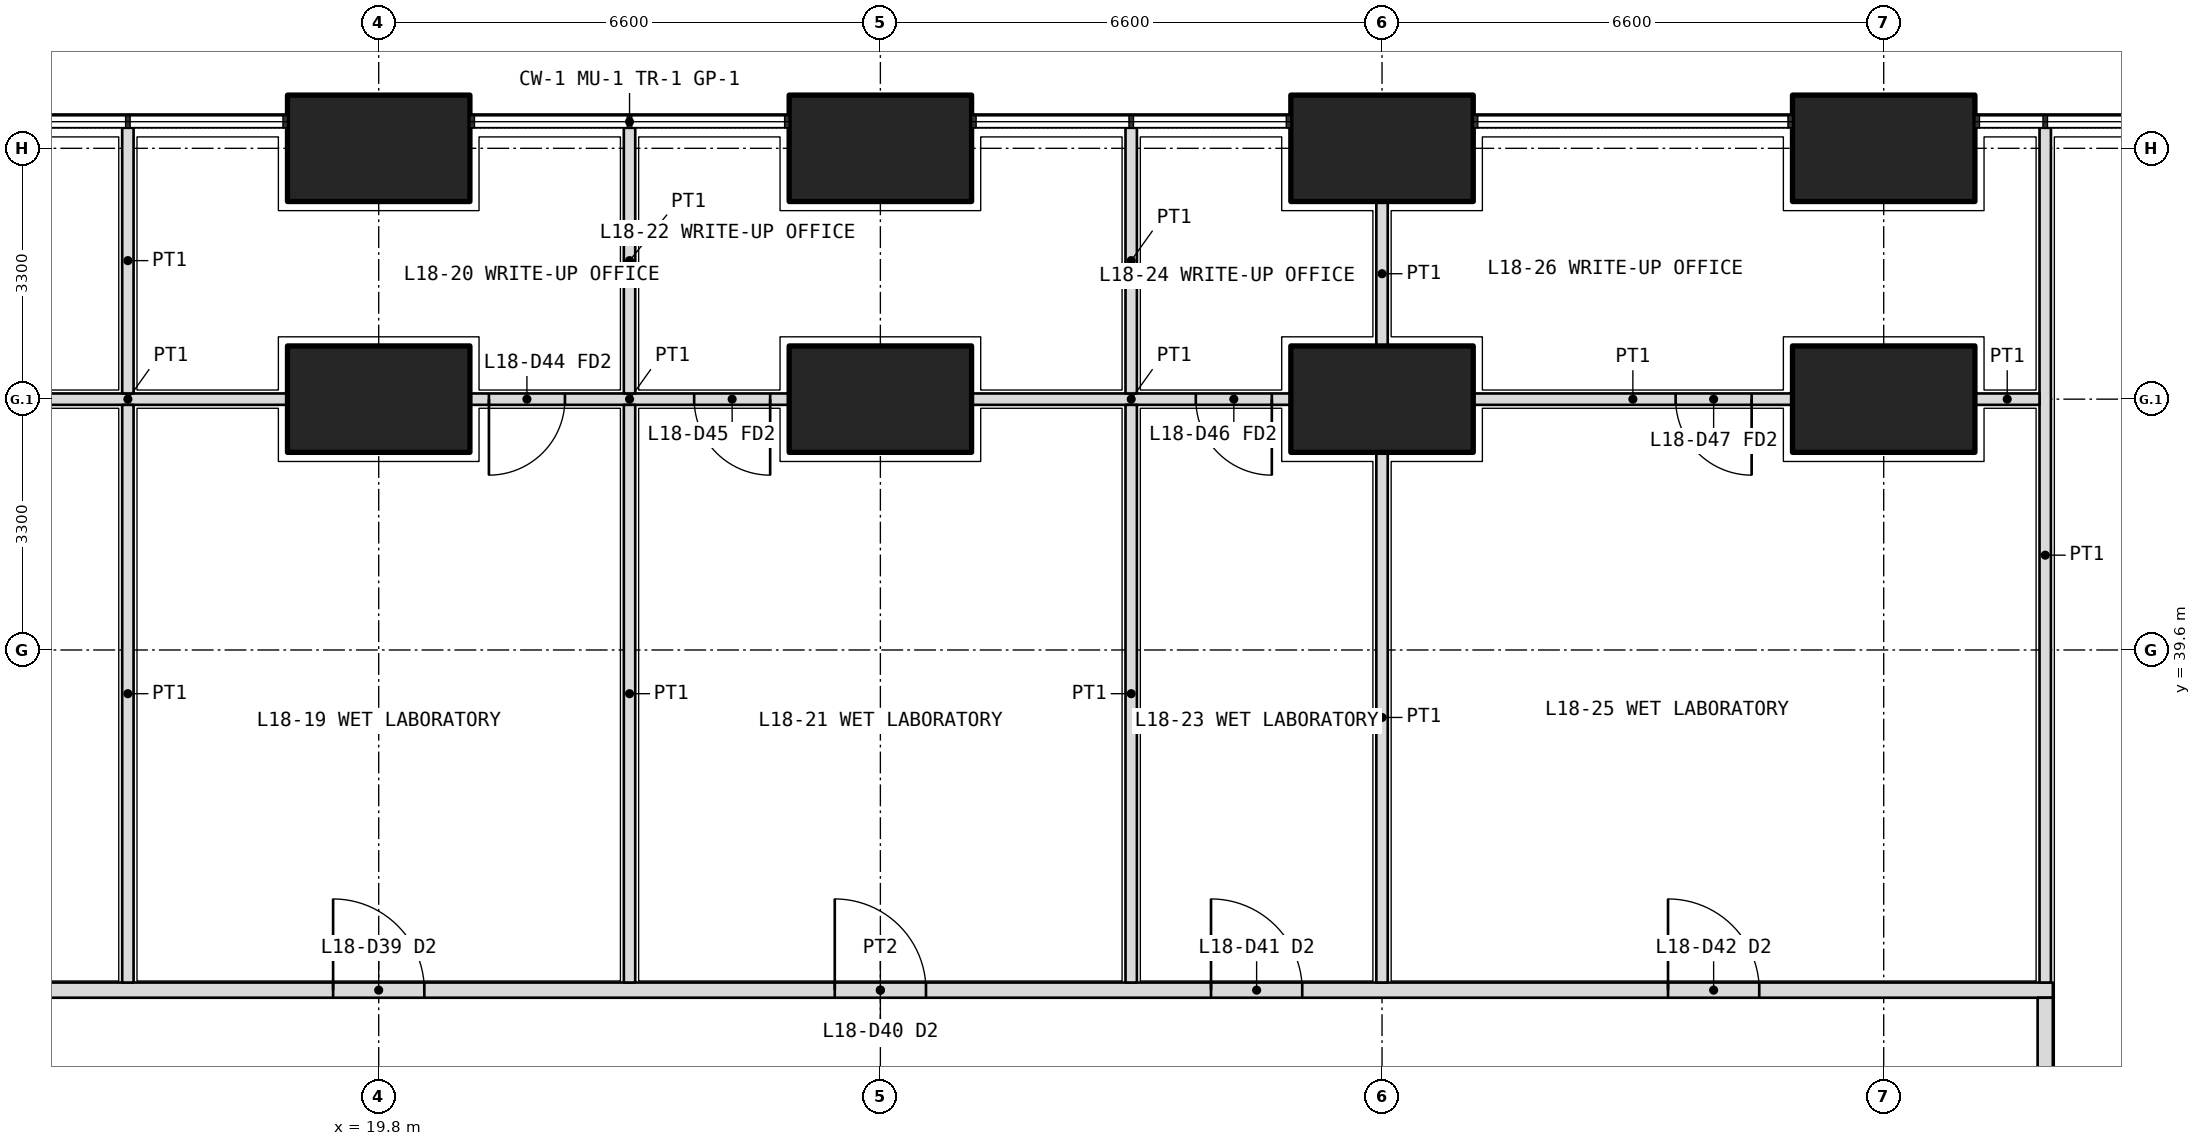
"""IFC4 building model, lengths in metres.
Left out: names, types, materials, properties, quantities, classifications, styles, units other than length and angle.
Written with IfcOpenShell. Run it as: python <this file> out.ifc"""

import sys

from ifc_helpers import new_model, si_unit, direction, frame, frame_2d, origin, origin_2d, place, context, subcontext, project, spatial, rectangle, extrude, element, fill, save


model = new_model("IFC4")
c1 = context("Model", 3, precision=1e-05, world=origin(), true_north=direction((0.0, 1.0)))
c2 = subcontext(c1, "Body", "Model", "MODEL_VIEW")
j1 = project(units=[si_unit("LENGTHUNIT", "METRE"), si_unit("PLANEANGLEUNIT", "RADIAN")], contexts=[c1])
p1 = place(None, origin())
s1 = spatial("IfcSite", under=j1, at=p1, CompositionType="ELEMENT")
p2 = place(p1, origin())
s2 = spatial("IfcBuilding", under=s1, at=p2, CompositionType="ELEMENT")
p3 = place(p2, frame((0.0, 0.0, 82.2)))
s3 = spatial("IfcBuildingStorey", under=s2, at=p3, CompositionType="ELEMENT", Elevation=82.2)
for number, where, z_axis, x_axis in (
    (1, (19.8, 46.2, 0.0), (0.0, 0.0, 1.0), (1.0, 0.0, 0.0)),
    (2, (26.4, 46.2, 0.0), (0.0, 0.0, 1.0), (1.0, 0.0, 0.0)),
    (3, (33.0, 46.2, 0.0), (0.0, 0.0, 1.0), (1.0, 0.0, 0.0)),
    (4, (39.6, 46.2, 0.0), (0.0, 0.0, 1.0), (1.0, 0.0, 0.0)),
    (5, (19.8, 42.9, 0.0), (0.0, 0.0, 1.0), (1.0, 0.0, 0.0)),
    (6, (26.4, 42.9, 0.0), (0.0, 0.0, 1.0), (1.0, 0.0, 0.0)),
    (7, (33.0, 42.9, 0.0), (0.0, 0.0, 1.0), (1.0, 0.0, 0.0)),
    (8, (39.6, 42.9, 0.0), (0.0, 0.0, 1.0), (1.0, 0.0, 0.0)),
):
    element("IfcColumn", number, at=place(p3, frame(where, z_axis=z_axis, x_axis=x_axis)), inside=s3, PredefinedType="COLUMN", context=c2, shape_type="SweptSolid", body=[
        extrude(rectangle(XDim=2.4, YDim=1.4, at=origin_2d()), origin(), (0.0, 0.0, 1.0), 4.2),
    ])
p4 = place(p3, frame((10.975, 35.125, 0.0), z_axis=(0.0, 0.0, 1.0), x_axis=(1.0, 0.0, 0.0)))
e9 = element("IfcWall", 9, at=p4, inside=s3, PredefinedType="PARTITIONING", context=c2, shape_type="SweptSolid", body=[
    extrude(rectangle(XDim=30.85, YDim=0.2, at=frame_2d((15.425, 0.0))), origin(), (0.0, 0.0, 1.0), 2.85),
])
p5 = place(p4, frame((2.212, 0.0, 0.0)))
e10 = element("IfcOpeningElement", 10, at=p5, cuts=e9, PredefinedType="OPENING", context=c2, shape_type="SweptSolid", body=[
    extrude(rectangle(XDim=1.2, YDim=2.1, at=frame_2d((0.6, 1.05))), frame((0.0, 0.11, 0.0), z_axis=(0.0, -1.0, 0.0), x_axis=(1.0, 0.0, 0.0)), (0.0, 0.0, 1.0), 0.22),
])
p6 = place(p4, frame((8.225, 0.0, 0.0)))
e11 = element("IfcOpeningElement", 11, at=p6, cuts=e9, PredefinedType="OPENING", context=c2, shape_type="SweptSolid", body=[
    extrude(rectangle(XDim=1.2, YDim=2.1, at=frame_2d((0.6, 1.05))), frame((0.0, 0.11, 0.0), z_axis=(0.0, -1.0, 0.0), x_axis=(1.0, 0.0, 0.0)), (0.0, 0.0, 1.0), 0.22),
])
p7 = place(p4, frame((14.825, 0.0, 0.0)))
e12 = element("IfcOpeningElement", 12, at=p7, cuts=e9, PredefinedType="OPENING", context=c2, shape_type="SweptSolid", body=[
    extrude(rectangle(XDim=1.2, YDim=2.1, at=frame_2d((0.6, 1.05))), frame((0.0, 0.11, 0.0), z_axis=(0.0, -1.0, 0.0), x_axis=(1.0, 0.0, 0.0)), (0.0, 0.0, 1.0), 0.22),
])
p8 = place(p4, frame((19.775, 0.0, 0.0)))
e13 = element("IfcOpeningElement", 13, at=p8, cuts=e9, PredefinedType="OPENING", context=c2, shape_type="SweptSolid", body=[
    extrude(rectangle(XDim=1.2, YDim=2.1, at=frame_2d((0.6, 1.05))), frame((0.0, 0.11, 0.0), z_axis=(0.0, -1.0, 0.0), x_axis=(1.0, 0.0, 0.0)), (0.0, 0.0, 1.0), 0.22),
])
p9 = place(p4, frame((25.788, 0.0, 0.0)))
e14 = element("IfcOpeningElement", 14, at=p9, cuts=e9, PredefinedType="OPENING", context=c2, shape_type="SweptSolid", body=[
    extrude(rectangle(XDim=1.2, YDim=2.1, at=frame_2d((0.6, 1.05))), frame((0.0, 0.11, 0.0), z_axis=(0.0, -1.0, 0.0), x_axis=(1.0, 0.0, 0.0)), (0.0, 0.0, 1.0), 0.22),
])
p10 = place(p3, frame((41.725, 7.4, 0.0), z_axis=(0.0, 0.0, 1.0), x_axis=(0.0, 1.0, 0.0)))
e15 = element("IfcWall", 15, at=p10, inside=s3, PredefinedType="PARTITIONING", context=c2, shape_type="SweptSolid", body=[
    extrude(rectangle(XDim=27.625, YDim=0.2, at=frame_2d((13.812, 0.0))), origin(), (0.0, 0.0, 1.0), 2.85),
])
p11 = place(p10, frame((4.0, 0.0, 0.0)))
e16 = element("IfcOpeningElement", 16, at=p11, cuts=e15, PredefinedType="OPENING", context=c2, shape_type="SweptSolid", body=[
    extrude(rectangle(XDim=1.0, YDim=2.1, at=frame_2d((0.5, 1.05))), frame((0.0, 0.11, 0.0), z_axis=(0.0, -1.0, 0.0), x_axis=(1.0, 0.0, 0.0)), (0.0, 0.0, 1.0), 0.22),
])
p12 = place(p10, frame((10.25, 0.0, 0.0)))
e17 = element("IfcOpeningElement", 17, at=p12, cuts=e15, PredefinedType="OPENING", context=c2, shape_type="SweptSolid", body=[
    extrude(rectangle(XDim=1.0, YDim=2.1, at=frame_2d((0.5, 1.05))), frame((0.0, 0.11, 0.0), z_axis=(0.0, -1.0, 0.0), x_axis=(1.0, 0.0, 0.0)), (0.0, 0.0, 1.0), 0.22),
])
p13 = place(p10, frame((13.5, 0.0, 0.0)))
e18 = element("IfcOpeningElement", 18, at=p13, cuts=e15, PredefinedType="OPENING", context=c2, shape_type="SweptSolid", body=[
    extrude(rectangle(XDim=1.0, YDim=2.1, at=frame_2d((0.5, 1.05))), frame((0.0, 0.11, 0.0), z_axis=(0.0, -1.0, 0.0), x_axis=(1.0, 0.0, 0.0)), (0.0, 0.0, 1.0), 0.22),
])
p14 = place(p10, frame((16.85, 0.0, 0.0)))
e19 = element("IfcOpeningElement", 19, at=p14, cuts=e15, PredefinedType="OPENING", context=c2, shape_type="SweptSolid", body=[
    extrude(rectangle(XDim=0.9, YDim=2.1, at=frame_2d((0.45, 1.05))), frame((0.0, 0.11, 0.0), z_axis=(0.0, -1.0, 0.0), x_axis=(1.0, 0.0, 0.0)), (0.0, 0.0, 1.0), 0.22),
])
p15 = place(p10, frame((20.15, 0.0, 0.0)))
e20 = element("IfcOpeningElement", 20, at=p15, cuts=e15, PredefinedType="OPENING", context=c2, shape_type="SweptSolid", body=[
    extrude(rectangle(XDim=1.0, YDim=2.1, at=frame_2d((0.5, 1.05))), frame((0.0, 0.11, 0.0), z_axis=(0.0, -1.0, 0.0), x_axis=(1.0, 0.0, 0.0)), (0.0, 0.0, 1.0), 0.22),
])
p16 = place(p10, frame((24.512, 0.0, 0.0)))
e21 = element("IfcOpeningElement", 21, at=p16, cuts=e15, PredefinedType="OPENING", context=c2, shape_type="SweptSolid", body=[
    extrude(rectangle(XDim=1.0, YDim=2.1, at=frame_2d((0.5, 1.05))), frame((0.0, 0.11, 0.0), z_axis=(0.0, -1.0, 0.0), x_axis=(1.0, 0.0, 0.0)), (0.0, 0.0, 1.0), 0.22),
])
p17 = place(p3, frame((41.725, 46.47, 0.0), z_axis=(0.0, 0.0, 1.0), x_axis=(0.0, -1.0, 0.0)))
e22 = element("IfcWall", 22, at=p17, inside=s3, PredefinedType="PARTITIONING", context=c2, shape_type="SweptSolid", body=[
    extrude(rectangle(XDim=11.245, YDim=0.15, at=frame_2d((5.623, 0.0))), origin(), (0.0, 0.0, 1.0), 2.7),
])
p18 = place(p3, frame((41.65, 42.9, 0.0), z_axis=(0.0, 0.0, 1.0), x_axis=(-1.0, 0.0, 0.0)))
e23 = element("IfcWall", 23, at=p18, inside=s3, PredefinedType="PARTITIONING", context=c2, shape_type="SweptSolid", body=[
    extrude(rectangle(XDim=0.85, YDim=0.15, at=frame_2d((0.425, 0.0))), origin(), (0.0, 0.0, 1.0), 3.9),
])
p19 = place(p3, frame((38.4, 42.9, 0.0), z_axis=(0.0, 0.0, 1.0), x_axis=(-1.0, 0.0, 0.0)))
e24 = element("IfcWall", 24, at=p19, inside=s3, PredefinedType="PARTITIONING", context=c2, shape_type="SweptSolid", body=[
    extrude(rectangle(XDim=4.2, YDim=0.15, at=frame_2d((2.1, 0.0))), origin(), (0.0, 0.0, 1.0), 3.9),
])
p20 = place(p19, frame((0.538, 0.0, 0.0)))
e25 = element("IfcOpeningElement", 25, at=p20, cuts=e24, PredefinedType="OPENING", context=c2, shape_type="SweptSolid", body=[
    extrude(rectangle(XDim=1.0, YDim=2.1, at=frame_2d((0.5, 1.05))), frame((0.0, 0.085, 0.0), z_axis=(0.0, -1.0, 0.0), x_axis=(1.0, 0.0, 0.0)), (0.0, 0.0, 1.0), 0.17),
])
p21 = place(p3, frame((31.8, 42.9, 0.0), z_axis=(0.0, 0.0, 1.0), x_axis=(-1.0, 0.0, 0.0)))
e26 = element("IfcWall", 26, at=p21, inside=s3, PredefinedType="PARTITIONING", context=c2, shape_type="SweptSolid", body=[
    extrude(rectangle(XDim=4.2, YDim=0.15, at=frame_2d((2.1, 0.0))), origin(), (0.0, 0.0, 1.0), 3.9),
])
p22 = place(p21, frame((0.25, 0.0, 0.0)))
e27 = element("IfcOpeningElement", 27, at=p22, cuts=e26, PredefinedType="OPENING", context=c2, shape_type="SweptSolid", body=[
    extrude(rectangle(XDim=1.0, YDim=2.1, at=frame_2d((0.5, 1.05))), frame((0.0, 0.085, 0.0), z_axis=(0.0, -1.0, 0.0), x_axis=(1.0, 0.0, 0.0)), (0.0, 0.0, 1.0), 0.17),
])
p23 = place(p3, frame((25.2, 42.9, 0.0), z_axis=(0.0, 0.0, 1.0), x_axis=(-1.0, 0.0, 0.0)))
e28 = element("IfcWall", 28, at=p23, inside=s3, PredefinedType="PARTITIONING", context=c2, shape_type="SweptSolid", body=[
    extrude(rectangle(XDim=4.2, YDim=0.15, at=frame_2d((2.1, 0.0))), origin(), (0.0, 0.0, 1.0), 3.9),
])
p24 = place(p23, frame((2.95, 0.0, 0.0)))
e29 = element("IfcOpeningElement", 29, at=p24, cuts=e28, PredefinedType="OPENING", context=c2, shape_type="SweptSolid", body=[
    extrude(rectangle(XDim=1.0, YDim=2.1, at=frame_2d((0.5, 1.05))), frame((0.0, 0.085, 0.0), z_axis=(0.0, -1.0, 0.0), x_axis=(1.0, 0.0, 0.0)), (0.0, 0.0, 1.0), 0.17),
])
p25 = place(p23, frame((0.25, 0.0, 0.0)))
e30 = element("IfcOpeningElement", 30, at=p25, cuts=e28, PredefinedType="OPENING", context=c2, shape_type="SweptSolid", body=[
    extrude(rectangle(XDim=1.0, YDim=2.1, at=frame_2d((0.5, 1.05))), frame((0.0, 0.085, 0.0), z_axis=(0.0, -1.0, 0.0), x_axis=(1.0, 0.0, 0.0)), (0.0, 0.0, 1.0), 0.17),
])
p26 = place(p3, frame((18.6, 42.9, 0.0), z_axis=(0.0, 0.0, 1.0), x_axis=(-1.0, 0.0, 0.0)))
e31 = element("IfcWall", 31, at=p26, inside=s3, PredefinedType="PARTITIONING", context=c2, shape_type="SweptSolid", body=[
    extrude(rectangle(XDim=4.2, YDim=0.15, at=frame_2d((2.1, 0.0))), origin(), (0.0, 0.0, 1.0), 3.9),
])
p27 = place(p3, frame((16.5, 46.47, 0.0), z_axis=(0.0, 0.0, 1.0), x_axis=(0.0, -1.0, 0.0)))
e32 = element("IfcWall", 32, at=p27, inside=s3, PredefinedType="PARTITIONING", context=c2, shape_type="SweptSolid", body=[
    extrude(rectangle(XDim=3.495, YDim=0.15, at=frame_2d((1.748, 0.0))), origin(), (0.0, 0.0, 1.0), 2.7),
])
p28 = place(p3, frame((16.5, 42.825, 0.0), z_axis=(0.0, 0.0, 1.0), x_axis=(0.0, -1.0, 0.0)))
e33 = element("IfcWall", 33, at=p28, inside=s3, PredefinedType="PARTITIONING", context=c2, shape_type="SweptSolid", body=[
    extrude(rectangle(XDim=7.6, YDim=0.15, at=frame_2d((3.8, 0.0))), origin(), (0.0, 0.0, 1.0), 3.9),
])
p29 = place(p3, frame((23.1, 46.47, 0.0), z_axis=(0.0, 0.0, 1.0), x_axis=(0.0, -1.0, 0.0)))
e34 = element("IfcWall", 34, at=p29, inside=s3, PredefinedType="PARTITIONING", context=c2, shape_type="SweptSolid", body=[
    extrude(rectangle(XDim=3.495, YDim=0.15, at=frame_2d((1.748, 0.0))), origin(), (0.0, 0.0, 1.0), 2.7),
])
p30 = place(p3, frame((23.1, 42.825, 0.0), z_axis=(0.0, 0.0, 1.0), x_axis=(0.0, -1.0, 0.0)))
e35 = element("IfcWall", 35, at=p30, inside=s3, PredefinedType="PARTITIONING", context=c2, shape_type="SweptSolid", body=[
    extrude(rectangle(XDim=7.6, YDim=0.15, at=frame_2d((3.8, 0.0))), origin(), (0.0, 0.0, 1.0), 3.9),
])
p31 = place(p3, frame((29.7, 46.47, 0.0), z_axis=(0.0, 0.0, 1.0), x_axis=(0.0, -1.0, 0.0)))
e36 = element("IfcWall", 36, at=p31, inside=s3, PredefinedType="PARTITIONING", context=c2, shape_type="SweptSolid", body=[
    extrude(rectangle(XDim=3.495, YDim=0.15, at=frame_2d((1.748, 0.0))), origin(), (0.0, 0.0, 1.0), 2.7),
])
p32 = place(p3, frame((29.7, 42.825, 0.0), z_axis=(0.0, 0.0, 1.0), x_axis=(0.0, -1.0, 0.0)))
e37 = element("IfcWall", 37, at=p32, inside=s3, PredefinedType="PARTITIONING", context=c2, shape_type="SweptSolid", body=[
    extrude(rectangle(XDim=7.6, YDim=0.15, at=frame_2d((3.8, 0.0))), origin(), (0.0, 0.0, 1.0), 3.9),
])
p33 = place(p3, frame((33.0, 45.5, 0.0), z_axis=(0.0, 0.0, 1.0), x_axis=(0.0, -1.0, 0.0)))
e38 = element("IfcWall", 38, at=p33, inside=s3, PredefinedType="PARTITIONING", context=c2, shape_type="SweptSolid", body=[
    extrude(rectangle(XDim=1.9, YDim=0.15, at=frame_2d((0.95, 0.0))), origin(), (0.0, 0.0, 1.0), 2.85),
])
p34 = place(p3, frame((33.0, 42.2, 0.0), z_axis=(0.0, 0.0, 1.0), x_axis=(0.0, -1.0, 0.0)))
e39 = element("IfcWall", 39, at=p34, inside=s3, PredefinedType="PARTITIONING", context=c2, shape_type="SweptSolid", body=[
    extrude(rectangle(XDim=6.975, YDim=0.15, at=frame_2d((3.487, 0.0))), origin(), (0.0, 0.0, 1.0), 2.85),
])
p35 = place(p6, origin())
e40 = element("IfcDoor", 40, at=p35, inside=s3, OperationType="DOUBLE_DOOR_SINGLE_SWING", PredefinedType="DOOR", context=c2, shape_type="SweptSolid", body=[
    extrude(rectangle(XDim=1.2, YDim=2.1, at=frame_2d((0.6, 1.05))), frame((0.0, 0.025, 0.0), z_axis=(0.0, -1.0, 0.0), x_axis=(1.0, 0.0, 0.0)), (0.0, 0.0, 1.0), 0.05),
])
fill(e11, e40)
p36 = place(p24, origin())
e41 = element("IfcDoor", 41, at=p36, inside=s3, OperationType="SINGLE_SWING_RIGHT", PredefinedType="DOOR", context=c2, shape_type="SweptSolid", body=[
    extrude(rectangle(XDim=1.0, YDim=2.1, at=frame_2d((0.5, 1.05))), frame((0.0, 0.025, 0.0), z_axis=(0.0, -1.0, 0.0), x_axis=(1.0, 0.0, 0.0)), (0.0, 0.0, 1.0), 0.05),
])
fill(e29, e41)
p37 = place(p7, origin())
e42 = element("IfcDoor", 42, at=p37, inside=s3, OperationType="DOUBLE_DOOR_SINGLE_SWING", PredefinedType="DOOR", context=c2, shape_type="SweptSolid", body=[
    extrude(rectangle(XDim=1.2, YDim=2.1, at=frame_2d((0.6, 1.05))), frame((0.0, 0.025, 0.0), z_axis=(0.0, -1.0, 0.0), x_axis=(1.0, 0.0, 0.0)), (0.0, 0.0, 1.0), 0.05),
])
fill(e12, e42)
p38 = place(p25, origin())
e43 = element("IfcDoor", 43, at=p38, inside=s3, OperationType="SINGLE_SWING_LEFT", PredefinedType="DOOR", context=c2, shape_type="SweptSolid", body=[
    extrude(rectangle(XDim=1.0, YDim=2.1, at=frame_2d((0.5, 1.05))), frame((0.0, 0.025, 0.0), z_axis=(0.0, -1.0, 0.0), x_axis=(1.0, 0.0, 0.0)), (0.0, 0.0, 1.0), 0.05),
])
fill(e30, e43)
p39 = place(p8, origin())
e44 = element("IfcDoor", 44, at=p39, inside=s3, OperationType="DOUBLE_DOOR_SINGLE_SWING", PredefinedType="DOOR", context=c2, shape_type="SweptSolid", body=[
    extrude(rectangle(XDim=1.2, YDim=2.1, at=frame_2d((0.6, 1.05))), frame((0.0, 0.025, 0.0), z_axis=(0.0, -1.0, 0.0), x_axis=(1.0, 0.0, 0.0)), (0.0, 0.0, 1.0), 0.05),
])
fill(e13, e44)
p40 = place(p22, origin())
e45 = element("IfcDoor", 45, at=p40, inside=s3, OperationType="SINGLE_SWING_LEFT", PredefinedType="DOOR", context=c2, shape_type="SweptSolid", body=[
    extrude(rectangle(XDim=1.0, YDim=2.1, at=frame_2d((0.5, 1.05))), frame((0.0, 0.025, 0.0), z_axis=(0.0, -1.0, 0.0), x_axis=(1.0, 0.0, 0.0)), (0.0, 0.0, 1.0), 0.05),
])
fill(e27, e45)
p41 = place(p9, origin())
e46 = element("IfcDoor", 46, at=p41, inside=s3, OperationType="DOUBLE_DOOR_SINGLE_SWING", PredefinedType="DOOR", context=c2, shape_type="SweptSolid", body=[
    extrude(rectangle(XDim=1.2, YDim=2.1, at=frame_2d((0.6, 1.05))), frame((0.0, 0.025, 0.0), z_axis=(0.0, -1.0, 0.0), x_axis=(1.0, 0.0, 0.0)), (0.0, 0.0, 1.0), 0.05),
])
fill(e14, e46)
p42 = place(p20, origin())
e47 = element("IfcDoor", 47, at=p42, inside=s3, OperationType="SINGLE_SWING_LEFT", PredefinedType="DOOR", context=c2, shape_type="SweptSolid", body=[
    extrude(rectangle(XDim=1.0, YDim=2.1, at=frame_2d((0.5, 1.05))), frame((0.0, 0.025, 0.0), z_axis=(0.0, -1.0, 0.0), x_axis=(1.0, 0.0, 0.0)), (0.0, 0.0, 1.0), 0.05),
])
fill(e25, e47)
save(model, sys.argv[1])
